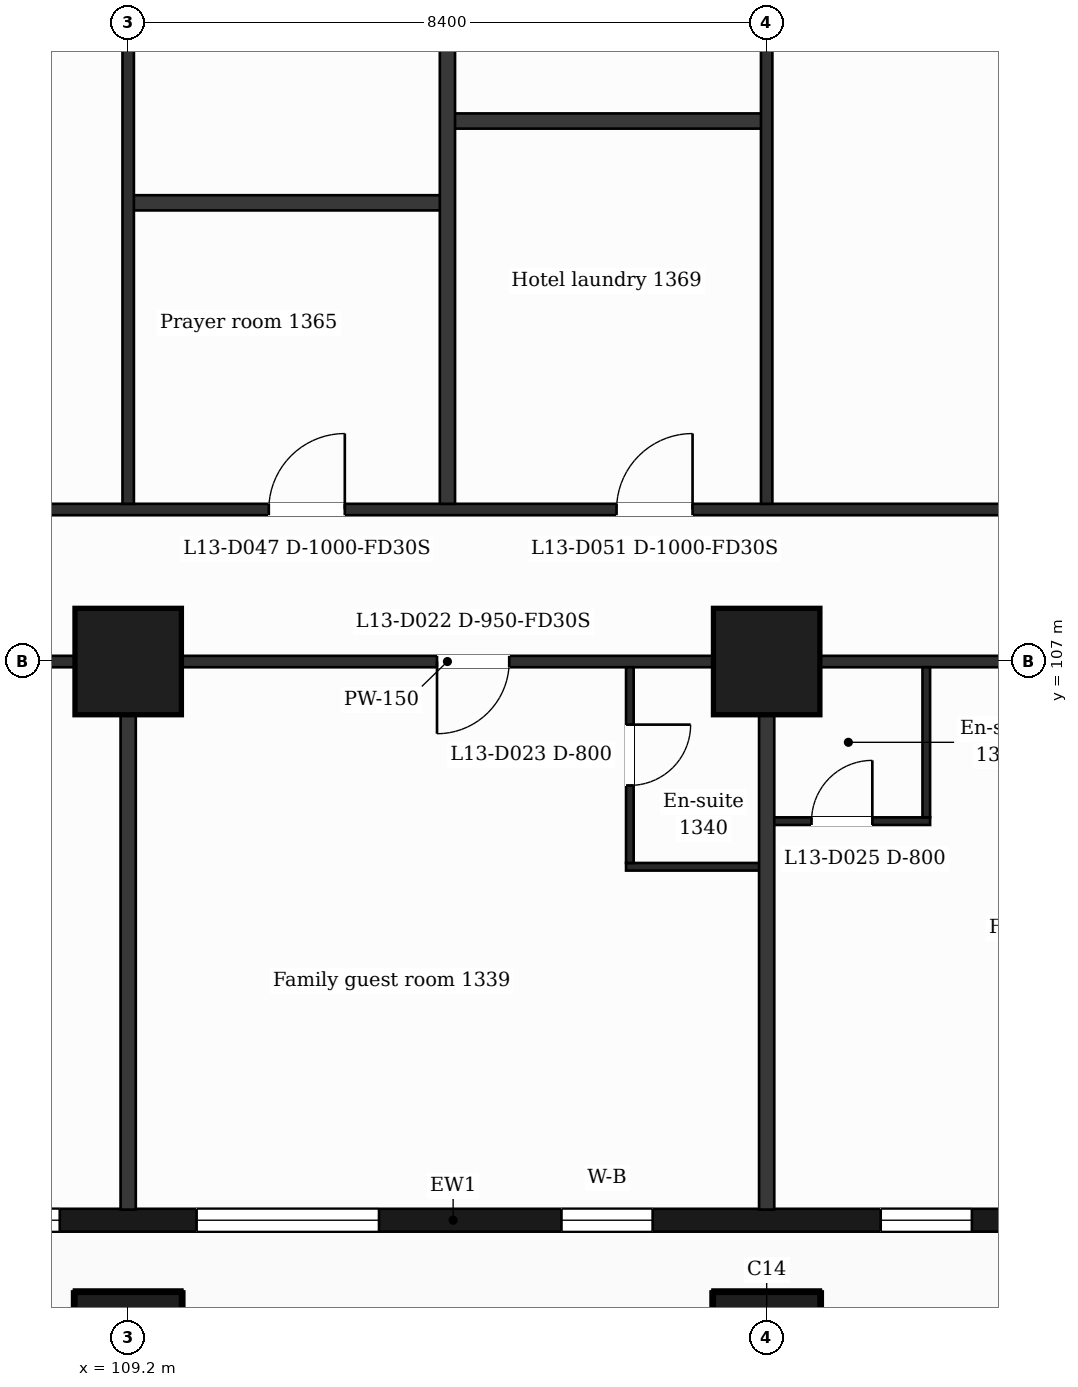
"""IFC4 building model, lengths in metres.
Left out: names, types, materials, properties, quantities, classifications, styles, units other than length and angle.
Written with IfcOpenShell. Run it as: python <this file> out.ifc"""

import sys

from ifc_helpers import new_model, si_unit, direction, frame, frame_2d, origin, origin_2d, place, context, subcontext, project, spatial, rectangle, extrude, element, fill, save


model = new_model("IFC4")
c1 = context("Model", 3, precision=1e-05, world=origin(), true_north=direction((0.0, 1.0)))
c2 = subcontext(c1, "Body", "Model", "MODEL_VIEW")
j1 = project(units=[si_unit("LENGTHUNIT", "METRE"), si_unit("PLANEANGLEUNIT", "RADIAN")], contexts=[c1])
p1 = place(None, origin())
s1 = spatial("IfcSite", under=j1, at=p1, CompositionType="ELEMENT")
p2 = place(p1, origin())
s2 = spatial("IfcBuilding", under=s1, at=p2, CompositionType="ELEMENT")
p3 = place(p2, frame((0.0, 0.0, 63.5)))
s3 = spatial("IfcBuildingStorey", under=s2, at=p3, CompositionType="ELEMENT", Elevation=63.5)
for number, where, z_axis, x_axis in (
    (1, (109.2, 98.0, 0.0), (0.0, 0.0, 1.0), (1.0, 0.0, 0.0)),
    (2, (117.6, 98.0, 0.0), (0.0, 0.0, 1.0), (1.0, 0.0, 0.0)),
    (3, (109.2, 107.0, 0.0), (0.0, 0.0, 1.0), (1.0, 0.0, 0.0)),
    (4, (117.6, 107.0, 0.0), (0.0, 0.0, 1.0), (1.0, 0.0, 0.0)),
):
    element("IfcColumn", number, at=place(p3, frame(where, z_axis=z_axis, x_axis=x_axis)), inside=s3, PredefinedType="COLUMN", context=c2, shape_type="SweptSolid", body=[
        extrude(rectangle(XDim=1.4, YDim=1.4, at=origin_2d()), origin(), (0.0, 0.0, 1.0), 3.5),
    ])
p4 = place(p3, frame((89.85, 99.65, 0.0), z_axis=(0.0, 0.0, 1.0), x_axis=(1.0, 0.0, 0.0)))
e5 = element("IfcWall", 5, at=p4, inside=s3, PredefinedType="SOLIDWALL", context=c2, shape_type="SweptSolid", body=[
    extrude(rectangle(XDim=47.25, YDim=0.3, at=frame_2d((23.625, 0.0))), origin(), (0.0, 0.0, 1.0), 3.18),
])
p5 = place(p4, frame((0.725, 0.0, 0.9)))
e6 = element("IfcOpeningElement", 6, at=p5, cuts=e5, PredefinedType="OPENING", context=c2, shape_type="SweptSolid", body=[
    extrude(rectangle(XDim=1.2, YDim=2.1, at=frame_2d((0.6, 1.05))), frame((0.0, 0.16, 0.0), z_axis=(0.0, -1.0, 0.0), x_axis=(1.0, 0.0, 0.0)), (0.0, 0.0, 1.0), 0.32),
])
p6 = place(p4, frame((3.45, 0.0, 0.9)))
e7 = element("IfcOpeningElement", 7, at=p6, cuts=e5, PredefinedType="OPENING", context=c2, shape_type="SweptSolid", body=[
    extrude(rectangle(XDim=2.4, YDim=2.1, at=frame_2d((1.2, 1.05))), frame((0.0, 0.16, 0.0), z_axis=(0.0, -1.0, 0.0), x_axis=(1.0, 0.0, 0.0)), (0.0, 0.0, 1.0), 0.32),
])
p7 = place(p4, frame((7.65, 0.0, 0.9)))
e8 = element("IfcOpeningElement", 8, at=p7, cuts=e5, PredefinedType="OPENING", context=c2, shape_type="SweptSolid", body=[
    extrude(rectangle(XDim=2.4, YDim=2.1, at=frame_2d((1.2, 1.05))), frame((0.0, 0.16, 0.0), z_axis=(0.0, -1.0, 0.0), x_axis=(1.0, 0.0, 0.0)), (0.0, 0.0, 1.0), 0.32),
])
p8 = place(p4, frame((11.85, 0.0, 0.9)))
e9 = element("IfcOpeningElement", 9, at=p8, cuts=e5, PredefinedType="OPENING", context=c2, shape_type="SweptSolid", body=[
    extrude(rectangle(XDim=2.4, YDim=2.1, at=frame_2d((1.2, 1.05))), frame((0.0, 0.16, 0.0), z_axis=(0.0, -1.0, 0.0), x_axis=(1.0, 0.0, 0.0)), (0.0, 0.0, 1.0), 0.32),
])
p9 = place(p4, frame((16.05, 0.0, 0.9)))
e10 = element("IfcOpeningElement", 10, at=p9, cuts=e5, PredefinedType="OPENING", context=c2, shape_type="SweptSolid", body=[
    extrude(rectangle(XDim=2.4, YDim=2.1, at=frame_2d((1.2, 1.05))), frame((0.0, 0.16, 0.0), z_axis=(0.0, -1.0, 0.0), x_axis=(1.0, 0.0, 0.0)), (0.0, 0.0, 1.0), 0.32),
])
p10 = place(p4, frame((20.25, 0.0, 0.9)))
e11 = element("IfcOpeningElement", 11, at=p10, cuts=e5, PredefinedType="OPENING", context=c2, shape_type="SweptSolid", body=[
    extrude(rectangle(XDim=2.4, YDim=2.1, at=frame_2d((1.2, 1.05))), frame((0.0, 0.16, 0.0), z_axis=(0.0, -1.0, 0.0), x_axis=(1.0, 0.0, 0.0)), (0.0, 0.0, 1.0), 0.32),
])
p11 = place(p4, frame((25.05, 0.0, 0.9)))
e12 = element("IfcOpeningElement", 12, at=p11, cuts=e5, PredefinedType="OPENING", context=c2, shape_type="SweptSolid", body=[
    extrude(rectangle(XDim=1.2, YDim=2.1, at=frame_2d((0.6, 1.05))), frame((0.0, 0.16, 0.0), z_axis=(0.0, -1.0, 0.0), x_axis=(1.0, 0.0, 0.0)), (0.0, 0.0, 1.0), 0.32),
])
p12 = place(p4, frame((29.25, 0.0, 0.9)))
e13 = element("IfcOpeningElement", 13, at=p12, cuts=e5, PredefinedType="OPENING", context=c2, shape_type="SweptSolid", body=[
    extrude(rectangle(XDim=1.2, YDim=2.1, at=frame_2d((0.6, 1.05))), frame((0.0, 0.16, 0.0), z_axis=(0.0, -1.0, 0.0), x_axis=(1.0, 0.0, 0.0)), (0.0, 0.0, 1.0), 0.32),
])
p13 = place(p4, frame((32.55, 0.0, 0.0)))
e14 = element("IfcOpeningElement", 14, at=p13, cuts=e5, PredefinedType="OPENING", context=c2, shape_type="SweptSolid", body=[
    extrude(rectangle(XDim=1.2, YDim=2.4, at=frame_2d((0.6, 1.2))), frame((0.0, 0.16, 0.0), z_axis=(0.0, -1.0, 0.0), x_axis=(1.0, 0.0, 0.0)), (0.0, 0.0, 1.0), 0.32),
])
p14 = place(p4, frame((34.35, 0.0, 0.9)))
e15 = element("IfcOpeningElement", 15, at=p14, cuts=e5, PredefinedType="OPENING", context=c2, shape_type="SweptSolid", body=[
    extrude(rectangle(XDim=1.2, YDim=2.1, at=frame_2d((0.6, 1.05))), frame((0.0, 0.16, 0.0), z_axis=(0.0, -1.0, 0.0), x_axis=(1.0, 0.0, 0.0)), (0.0, 0.0, 1.0), 0.32),
])
p15 = place(p4, frame((37.05, 0.0, 0.9)))
e16 = element("IfcOpeningElement", 16, at=p15, cuts=e5, PredefinedType="OPENING", context=c2, shape_type="SweptSolid", body=[
    extrude(rectangle(XDim=2.4, YDim=2.1, at=frame_2d((1.2, 1.05))), frame((0.0, 0.16, 0.0), z_axis=(0.0, -1.0, 0.0), x_axis=(1.0, 0.0, 0.0)), (0.0, 0.0, 1.0), 0.32),
])
p16 = place(p4, frame((40.95, 0.0, 0.0)))
e17 = element("IfcOpeningElement", 17, at=p16, cuts=e5, PredefinedType="OPENING", context=c2, shape_type="SweptSolid", body=[
    extrude(rectangle(XDim=1.2, YDim=2.4, at=frame_2d((0.6, 1.2))), frame((0.0, 0.16, 0.0), z_axis=(0.0, -1.0, 0.0), x_axis=(1.0, 0.0, 0.0)), (0.0, 0.0, 1.0), 0.32),
])
p17 = place(p4, frame((42.75, 0.0, 0.9)))
e18 = element("IfcOpeningElement", 18, at=p17, cuts=e5, PredefinedType="OPENING", context=c2, shape_type="SweptSolid", body=[
    extrude(rectangle(XDim=1.2, YDim=2.1, at=frame_2d((0.6, 1.05))), frame((0.0, 0.16, 0.0), z_axis=(0.0, -1.0, 0.0), x_axis=(1.0, 0.0, 0.0)), (0.0, 0.0, 1.0), 0.32),
])
p18 = place(p4, frame((45.25, 0.0, 0.9)))
e19 = element("IfcOpeningElement", 19, at=p18, cuts=e5, PredefinedType="OPENING", context=c2, shape_type="SweptSolid", body=[
    extrude(rectangle(XDim=1.2, YDim=2.1, at=frame_2d((0.6, 1.05))), frame((0.0, 0.16, 0.0), z_axis=(0.0, -1.0, 0.0), x_axis=(1.0, 0.0, 0.0)), (0.0, 0.0, 1.0), 0.32),
])
p19 = place(p3, frame((115.75, 104.3, 0.0), z_axis=(0.0, 0.0, 1.0), x_axis=(1.0, 0.0, 0.0)))
e20 = element("IfcWall", 20, at=p19, inside=s3, PredefinedType="PARTITIONING", context=c2, shape_type="SweptSolid", body=[
    extrude(rectangle(XDim=1.85, YDim=0.1, at=frame_2d((0.925, 0.0))), origin(), (0.0, 0.0, 1.0), 3.18),
])
p20 = place(p3, frame((117.6, 104.9, 0.0), z_axis=(0.0, 0.0, 1.0), x_axis=(1.0, 0.0, 0.0)))
e21 = element("IfcWall", 21, at=p20, inside=s3, PredefinedType="PARTITIONING", context=c2, shape_type="SweptSolid", body=[
    extrude(rectangle(XDim=2.15, YDim=0.1, at=frame_2d((1.075, 0.0))), origin(), (0.0, 0.0, 1.0), 3.18),
])
p21 = place(p20, frame((0.59, 0.0, 0.0)))
e22 = element("IfcOpeningElement", 22, at=p21, cuts=e21, PredefinedType="OPENING", context=c2, shape_type="SweptSolid", body=[
    extrude(rectangle(XDim=0.8, YDim=2.1, at=frame_2d((0.4, 1.05))), frame((0.0, 0.06, 0.0), z_axis=(0.0, -1.0, 0.0), x_axis=(1.0, 0.0, 0.0)), (0.0, 0.0, 1.0), 0.12),
])
p22 = place(p3, frame((87.018, 107.0, 0.0), z_axis=(0.0, 0.0, 1.0), x_axis=(1.0, 0.0, 0.0)))
e23 = element("IfcWall", 23, at=p22, inside=s3, PredefinedType="PARTITIONING", context=c2, shape_type="SweptSolid", body=[
    extrude(rectangle(XDim=52.765, YDim=0.15, at=frame_2d((26.382, 0.0))), origin(), (0.0, 0.0, 1.0), 3.18),
])
p23 = place(p22, frame((1.032, 0.0, 0.0)))
e24 = element("IfcOpeningElement", 24, at=p23, cuts=e23, PredefinedType="OPENING", context=c2, shape_type="SweptSolid", body=[
    extrude(rectangle(XDim=0.95, YDim=2.1, at=frame_2d((0.475, 1.05))), frame((0.0, 0.085, 0.0), z_axis=(0.0, -1.0, 0.0), x_axis=(1.0, 0.0, 0.0)), (0.0, 0.0, 1.0), 0.17),
])
p24 = place(p22, frame((6.894, 0.0, 0.0)))
e25 = element("IfcOpeningElement", 25, at=p24, cuts=e23, PredefinedType="OPENING", context=c2, shape_type="SweptSolid", body=[
    extrude(rectangle(XDim=0.95, YDim=2.1, at=frame_2d((0.475, 1.05))), frame((0.0, 0.085, 0.0), z_axis=(0.0, -1.0, 0.0), x_axis=(1.0, 0.0, 0.0)), (0.0, 0.0, 1.0), 0.17),
])
p25 = place(p22, frame((17.844, 0.0, 0.0)))
e26 = element("IfcOpeningElement", 26, at=p25, cuts=e23, PredefinedType="OPENING", context=c2, shape_type="SweptSolid", body=[
    extrude(rectangle(XDim=0.95, YDim=2.1, at=frame_2d((0.475, 1.05))), frame((0.0, 0.085, 0.0), z_axis=(0.0, -1.0, 0.0), x_axis=(1.0, 0.0, 0.0)), (0.0, 0.0, 1.0), 0.17),
])
p26 = place(p22, frame((26.245, 0.0, 0.0)))
e27 = element("IfcOpeningElement", 27, at=p26, cuts=e23, PredefinedType="OPENING", context=c2, shape_type="SweptSolid", body=[
    extrude(rectangle(XDim=0.95, YDim=2.1, at=frame_2d((0.475, 1.05))), frame((0.0, 0.085, 0.0), z_axis=(0.0, -1.0, 0.0), x_axis=(1.0, 0.0, 0.0)), (0.0, 0.0, 1.0), 0.17),
])
p27 = place(p22, frame((35.822, 0.0, 0.0)))
e28 = element("IfcOpeningElement", 28, at=p27, cuts=e23, PredefinedType="OPENING", context=c2, shape_type="SweptSolid", body=[
    extrude(rectangle(XDim=0.95, YDim=2.1, at=frame_2d((0.475, 1.05))), frame((0.0, 0.085, 0.0), z_axis=(0.0, -1.0, 0.0), x_axis=(1.0, 0.0, 0.0)), (0.0, 0.0, 1.0), 0.17),
])
p28 = place(p22, frame((42.302, 0.0, 0.0)))
e29 = element("IfcOpeningElement", 29, at=p28, cuts=e23, PredefinedType="OPENING", context=c2, shape_type="SweptSolid", body=[
    extrude(rectangle(XDim=0.95, YDim=2.1, at=frame_2d((0.475, 1.05))), frame((0.0, 0.085, 0.0), z_axis=(0.0, -1.0, 0.0), x_axis=(1.0, 0.0, 0.0)), (0.0, 0.0, 1.0), 0.17),
])
p29 = place(p22, frame((49.285, 0.0, 0.0)))
e30 = element("IfcOpeningElement", 30, at=p29, cuts=e23, PredefinedType="OPENING", context=c2, shape_type="SweptSolid", body=[
    extrude(rectangle(XDim=0.95, YDim=2.1, at=frame_2d((0.475, 1.05))), frame((0.0, 0.085, 0.0), z_axis=(0.0, -1.0, 0.0), x_axis=(1.0, 0.0, 0.0)), (0.0, 0.0, 1.0), 0.17),
])
p30 = place(p3, frame((100.725, 109.0, 0.0), z_axis=(0.0, 0.0, 1.0), x_axis=(1.0, 0.0, 0.0)))
e31 = element("IfcWall", 31, at=p30, inside=s3, PredefinedType="PARTITIONING", context=c2, shape_type="SweptSolid", body=[
    extrude(rectangle(XDim=25.35, YDim=0.15, at=frame_2d((12.675, 0.0))), origin(), (0.0, 0.0, 1.0), 3.18),
])
p31 = place(p30, frame((1.975, 0.0, 0.0)))
e32 = element("IfcOpeningElement", 32, at=p31, cuts=e31, PredefinedType="OPENING", context=c2, shape_type="SweptSolid", body=[
    extrude(rectangle(XDim=1.0, YDim=2.1, at=frame_2d((0.5, 1.05))), frame((0.0, 0.085, 0.0), z_axis=(0.0, -1.0, 0.0), x_axis=(1.0, 0.0, 0.0)), (0.0, 0.0, 1.0), 0.17),
])
p32 = place(p30, frame((10.325, 0.0, 0.0)))
e33 = element("IfcOpeningElement", 33, at=p32, cuts=e31, PredefinedType="OPENING", context=c2, shape_type="SweptSolid", body=[
    extrude(rectangle(XDim=1.0, YDim=2.1, at=frame_2d((0.5, 1.05))), frame((0.0, 0.085, 0.0), z_axis=(0.0, -1.0, 0.0), x_axis=(1.0, 0.0, 0.0)), (0.0, 0.0, 1.0), 0.17),
])
p33 = place(p30, frame((14.9, 0.0, 0.0)))
e34 = element("IfcOpeningElement", 34, at=p33, cuts=e31, PredefinedType="OPENING", context=c2, shape_type="SweptSolid", body=[
    extrude(rectangle(XDim=1.0, YDim=2.1, at=frame_2d((0.5, 1.05))), frame((0.0, 0.085, 0.0), z_axis=(0.0, -1.0, 0.0), x_axis=(1.0, 0.0, 0.0)), (0.0, 0.0, 1.0), 0.17),
])
p34 = place(p30, frame((22.685, 0.0, 0.0)))
e35 = element("IfcOpeningElement", 35, at=p34, cuts=e31, PredefinedType="OPENING", context=c2, shape_type="SweptSolid", body=[
    extrude(rectangle(XDim=1.0, YDim=2.1, at=frame_2d((0.5, 1.05))), frame((0.0, 0.085, 0.0), z_axis=(0.0, -1.0, 0.0), x_axis=(1.0, 0.0, 0.0)), (0.0, 0.0, 1.0), 0.17),
])
p35 = place(p3, frame((109.2, 113.035, 0.0), z_axis=(0.0, 0.0, 1.0), x_axis=(1.0, 0.0, 0.0)))
e36 = element("IfcWall", 36, at=p35, inside=s3, PredefinedType="PARTITIONING", context=c2, shape_type="SweptSolid", body=[
    extrude(rectangle(XDim=4.2, YDim=0.2, at=frame_2d((2.1, 0.0))), origin(), (0.0, 0.0, 1.0), 3.18),
])
p36 = place(p3, frame((113.4, 114.111, 0.0), z_axis=(0.0, 0.0, 1.0), x_axis=(1.0, 0.0, 0.0)))
e37 = element("IfcWall", 37, at=p36, inside=s3, PredefinedType="PARTITIONING", context=c2, shape_type="SweptSolid", body=[
    extrude(rectangle(XDim=4.2, YDim=0.2, at=frame_2d((2.1, 0.0))), origin(), (0.0, 0.0, 1.0), 3.18),
])
p37 = place(p3, frame((109.2, 99.79, 0.0), z_axis=(0.0, 0.0, 1.0), x_axis=(0.0, 1.0, 0.0)))
e38 = element("IfcWall", 38, at=p37, inside=s3, PredefinedType="PARTITIONING", context=c2, shape_type="SweptSolid", body=[
    extrude(rectangle(XDim=7.135, YDim=0.2, at=frame_2d((3.567, 0.0))), origin(), (0.0, 0.0, 1.0), 3.18),
])
p38 = place(p3, frame((109.2, 109.075, 0.0), z_axis=(0.0, 0.0, 1.0), x_axis=(0.0, 1.0, 0.0)))
e39 = element("IfcWall", 39, at=p38, inside=s3, PredefinedType="PARTITIONING", context=c2, shape_type="SweptSolid", body=[
    extrude(rectangle(XDim=13.3, YDim=0.15, at=frame_2d((6.65, 0.0))), origin(), (0.0, 0.0, 1.0), 3.18),
])
p39 = place(p38, frame((8.939, 0.0, 0.0)))
e40 = element("IfcOpeningElement", 40, at=p39, cuts=e39, PredefinedType="OPENING", context=c2, shape_type="SweptSolid", body=[
    extrude(rectangle(XDim=1.0, YDim=2.1, at=frame_2d((0.5, 1.05))), frame((0.0, 0.085, 0.0), z_axis=(0.0, -1.0, 0.0), x_axis=(1.0, 0.0, 0.0)), (0.0, 0.0, 1.0), 0.17),
])
p40 = place(p3, frame((113.4, 109.075, 0.0), z_axis=(0.0, 0.0, 1.0), x_axis=(0.0, 1.0, 0.0)))
e41 = element("IfcWall", 41, at=p40, inside=s3, PredefinedType="PARTITIONING", context=c2, shape_type="SweptSolid", body=[
    extrude(rectangle(XDim=13.3, YDim=0.2, at=frame_2d((6.65, 0.0))), origin(), (0.0, 0.0, 1.0), 3.18),
])
p41 = place(p3, frame((115.8, 104.35, 0.0), z_axis=(0.0, 0.0, 1.0), x_axis=(0.0, 1.0, 0.0)))
e42 = element("IfcWall", 42, at=p41, inside=s3, PredefinedType="PARTITIONING", context=c2, shape_type="SweptSolid", body=[
    extrude(rectangle(XDim=2.575, YDim=0.1, at=frame_2d((1.288, 0.0))), origin(), (0.0, 0.0, 1.0), 3.18),
])
p42 = place(p41, frame((1.02, 0.0, 0.0)))
e43 = element("IfcOpeningElement", 43, at=p42, cuts=e42, PredefinedType="OPENING", context=c2, shape_type="SweptSolid", body=[
    extrude(rectangle(XDim=0.8, YDim=2.1, at=frame_2d((0.4, 1.05))), frame((0.0, 0.06, 0.0), z_axis=(0.0, -1.0, 0.0), x_axis=(1.0, 0.0, 0.0)), (0.0, 0.0, 1.0), 0.12),
])
p43 = place(p3, frame((117.6, 99.79, 0.0), z_axis=(0.0, 0.0, 1.0), x_axis=(0.0, 1.0, 0.0)))
e44 = element("IfcWall", 44, at=p43, inside=s3, PredefinedType="PARTITIONING", context=c2, shape_type="SweptSolid", body=[
    extrude(rectangle(XDim=7.135, YDim=0.2, at=frame_2d((3.567, 0.0))), origin(), (0.0, 0.0, 1.0), 3.18),
])
p44 = place(p3, frame((117.6, 109.075, 0.0), z_axis=(0.0, 0.0, 1.0), x_axis=(0.0, 1.0, 0.0)))
e45 = element("IfcWall", 45, at=p44, inside=s3, PredefinedType="PARTITIONING", context=c2, shape_type="SweptSolid", body=[
    extrude(rectangle(XDim=13.3, YDim=0.15, at=frame_2d((6.65, 0.0))), origin(), (0.0, 0.0, 1.0), 3.18),
])
p45 = place(p44, frame((8.042, 0.0, 0.0)))
e46 = element("IfcOpeningElement", 46, at=p45, cuts=e45, PredefinedType="OPENING", context=c2, shape_type="SweptSolid", body=[
    extrude(rectangle(XDim=1.0, YDim=2.1, at=frame_2d((0.5, 1.05))), frame((0.0, 0.085, 0.0), z_axis=(0.0, -1.0, 0.0), x_axis=(1.0, 0.0, 0.0)), (0.0, 0.0, 1.0), 0.17),
])
p46 = place(p3, frame((119.7, 104.95, 0.0), z_axis=(0.0, 0.0, 1.0), x_axis=(0.0, 1.0, 0.0)))
e47 = element("IfcWall", 47, at=p46, inside=s3, PredefinedType="PARTITIONING", context=c2, shape_type="SweptSolid", body=[
    extrude(rectangle(XDim=1.975, YDim=0.1, at=frame_2d((0.988, 0.0))), origin(), (0.0, 0.0, 1.0), 3.18),
])
p47 = place(p9, origin())
e48 = element("IfcWindow", 48, at=p47, inside=s3, PartitioningType="SINGLE_PANEL", PredefinedType="WINDOW", context=c2, shape_type="SweptSolid", body=[
    extrude(rectangle(XDim=2.4, YDim=2.1, at=frame_2d((1.2, 1.05))), frame((0.0, 0.03, 0.0), z_axis=(0.0, -1.0, 0.0), x_axis=(1.0, 0.0, 0.0)), (0.0, 0.0, 1.0), 0.06),
])
fill(e10, e48)
p48 = place(p10, origin())
e49 = element("IfcWindow", 49, at=p48, inside=s3, PartitioningType="SINGLE_PANEL", PredefinedType="WINDOW", context=c2, shape_type="SweptSolid", body=[
    extrude(rectangle(XDim=2.4, YDim=2.1, at=frame_2d((1.2, 1.05))), frame((0.0, 0.03, 0.0), z_axis=(0.0, -1.0, 0.0), x_axis=(1.0, 0.0, 0.0)), (0.0, 0.0, 1.0), 0.06),
])
fill(e11, e49)
p49 = place(p11, origin())
e50 = element("IfcWindow", 50, at=p49, inside=s3, PartitioningType="SINGLE_PANEL", PredefinedType="WINDOW", context=c2, shape_type="SweptSolid", body=[
    extrude(rectangle(XDim=1.2, YDim=2.1, at=frame_2d((0.6, 1.05))), frame((0.0, 0.03, 0.0), z_axis=(0.0, -1.0, 0.0), x_axis=(1.0, 0.0, 0.0)), (0.0, 0.0, 1.0), 0.06),
])
fill(e12, e50)
p50 = place(p12, origin())
e51 = element("IfcWindow", 51, at=p50, inside=s3, PartitioningType="SINGLE_PANEL", PredefinedType="WINDOW", context=c2, shape_type="SweptSolid", body=[
    extrude(rectangle(XDim=1.2, YDim=2.1, at=frame_2d((0.6, 1.05))), frame((0.0, 0.03, 0.0), z_axis=(0.0, -1.0, 0.0), x_axis=(1.0, 0.0, 0.0)), (0.0, 0.0, 1.0), 0.06),
])
fill(e13, e51)
p51 = place(p26, origin())
e52 = element("IfcDoor", 52, at=p51, inside=s3, OperationType="SINGLE_SWING_LEFT", PredefinedType="DOOR", context=c2, shape_type="SweptSolid", body=[
    extrude(rectangle(XDim=0.95, YDim=2.1, at=frame_2d((0.475, 1.05))), frame((0.0, 0.025, 0.0), z_axis=(0.0, -1.0, 0.0), x_axis=(1.0, 0.0, 0.0)), (0.0, 0.0, 1.0), 0.05),
])
fill(e27, e52)
p52 = place(p42, origin())
e53 = element("IfcDoor", 53, at=p52, inside=s3, OperationType="SINGLE_SWING_RIGHT", PredefinedType="DOOR", context=c2, shape_type="SweptSolid", body=[
    extrude(rectangle(XDim=0.8, YDim=2.1, at=frame_2d((0.4, 1.05))), frame((0.0, 0.025, 0.0), z_axis=(0.0, -1.0, 0.0), x_axis=(1.0, 0.0, 0.0)), (0.0, 0.0, 1.0), 0.05),
])
fill(e43, e53)
p53 = place(p21, origin())
e54 = element("IfcDoor", 54, at=p53, inside=s3, OperationType="SINGLE_SWING_RIGHT", PredefinedType="DOOR", context=c2, shape_type="SweptSolid", body=[
    extrude(rectangle(XDim=0.8, YDim=2.1, at=frame_2d((0.4, 1.05))), frame((0.0, 0.025, 0.0), z_axis=(0.0, -1.0, 0.0), x_axis=(1.0, 0.0, 0.0)), (0.0, 0.0, 1.0), 0.05),
])
fill(e22, e54)
p54 = place(p32, origin())
e55 = element("IfcDoor", 55, at=p54, inside=s3, OperationType="SINGLE_SWING_RIGHT", PredefinedType="DOOR", context=c2, shape_type="SweptSolid", body=[
    extrude(rectangle(XDim=1.0, YDim=2.1, at=frame_2d((0.5, 1.05))), frame((0.0, 0.025, 0.0), z_axis=(0.0, -1.0, 0.0), x_axis=(1.0, 0.0, 0.0)), (0.0, 0.0, 1.0), 0.05),
])
fill(e33, e55)
p55 = place(p33, origin())
e56 = element("IfcDoor", 56, at=p55, inside=s3, OperationType="SINGLE_SWING_RIGHT", PredefinedType="DOOR", context=c2, shape_type="SweptSolid", body=[
    extrude(rectangle(XDim=1.0, YDim=2.1, at=frame_2d((0.5, 1.05))), frame((0.0, 0.025, 0.0), z_axis=(0.0, -1.0, 0.0), x_axis=(1.0, 0.0, 0.0)), (0.0, 0.0, 1.0), 0.05),
])
fill(e34, e56)
save(model, sys.argv[1])
